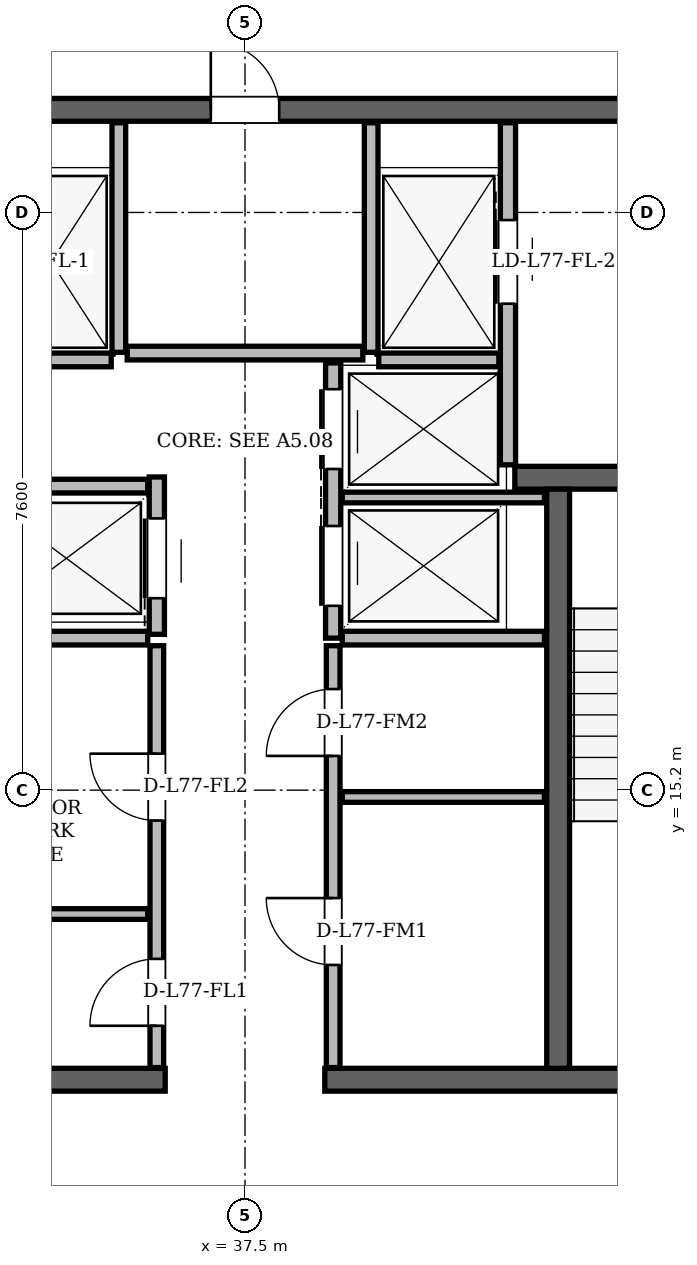
"""IFC4 building model, lengths in metres.
Left out: names, types, materials, properties, quantities, classifications, styles, units other than length and angle.
Written with IfcOpenShell. Run it as: python <this file> out.ifc"""

import sys

from ifc_helpers import new_model, si_unit, direction, frame, frame_2d, origin, place, context, subcontext, project, spatial, rectangle, extrude, element, fill, save


model = new_model("IFC4")
c1 = context("Model", 3, precision=1e-05, world=origin(), true_north=direction((0.0, 1.0)))
c2 = subcontext(c1, "Body", "Model", "MODEL_VIEW")
j1 = project(units=[si_unit("LENGTHUNIT", "METRE"), si_unit("PLANEANGLEUNIT", "RADIAN")], contexts=[c1])
p1 = place(None, origin())
s1 = spatial("IfcSite", under=j1, at=p1, CompositionType="ELEMENT")
p2 = place(p1, origin())
s2 = spatial("IfcBuilding", under=s1, at=p2, CompositionType="ELEMENT")
p3 = place(p2, frame((0.0, 0.0, 292.8)))
s3 = spatial("IfcBuildingStorey", under=s2, at=p3, CompositionType="ELEMENT", Elevation=292.8)
for number, where, z_axis, x_axis in (
    (1, (29.35, 11.39, 0.0), (0.0, 0.0, 1.0), (1.0, 0.0, 0.0)),
    (2, (38.55, 11.39, 0.0), (0.0, 0.0, 1.0), (1.0, 0.0, 0.0)),
):
    element("IfcWall", number, at=place(p3, frame(where, z_axis=z_axis, x_axis=x_axis)), inside=s3, PredefinedType="SHEAR", context=c2, shape_type="SweptSolid", body=[
        extrude(rectangle(XDim=7.1, YDim=0.3, at=frame_2d((3.55, 0.0))), origin(), (0.0, 0.0, 1.0), 3.68),
    ])
p4 = place(p3, frame((29.65, 24.15, 0.0), z_axis=(0.0, 0.0, 1.0), x_axis=(1.0, 0.0, 0.0)))
e3 = element("IfcWall", 3, at=p4, inside=s3, PredefinedType="SHEAR", context=c2, shape_type="SweptSolid", body=[
    extrude(rectangle(XDim=15.7, YDim=0.3, at=frame_2d((7.85, 0.0))), origin(), (0.0, 0.0, 1.0), 3.68),
])
p5 = place(p4, frame((1.7, 0.0, 0.0)))
e4 = element("IfcOpeningElement", 4, at=p5, cuts=e3, PredefinedType="OPENING", context=c2, shape_type="SweptSolid", body=[
    extrude(rectangle(XDim=1.2, YDim=2.2, at=frame_2d((0.6, 1.1))), frame((0.0, 0.15, 0.0), z_axis=(0.0, -1.0, 0.0), x_axis=(1.0, 0.0, 0.0)), (0.0, 0.0, 1.0), 0.3),
])
p6 = place(p4, frame((12.8, 0.0, 0.0)))
e5 = element("IfcOpeningElement", 5, at=p6, cuts=e3, PredefinedType="OPENING", context=c2, shape_type="SweptSolid", body=[
    extrude(rectangle(XDim=1.2, YDim=2.2, at=frame_2d((0.6, 1.1))), frame((0.0, 0.15, 0.0), z_axis=(0.0, -1.0, 0.0), x_axis=(1.0, 0.0, 0.0)), (0.0, 0.0, 1.0), 0.3),
])
p7 = place(p4, frame((7.4, 0.0, 0.0)))
e6 = element("IfcOpeningElement", 6, at=p7, cuts=e3, PredefinedType="OPENING", context=c2, shape_type="SweptSolid", body=[
    extrude(rectangle(XDim=0.9, YDim=2.05, at=frame_2d((0.45, 1.025))), frame((0.0, 0.15, 0.0), z_axis=(0.0, -1.0, 0.0), x_axis=(1.0, 0.0, 0.0)), (0.0, 0.0, 1.0), 0.3),
])
p8 = place(p3, frame((41.05, 19.31, 0.0), z_axis=(0.0, 0.0, 1.0), x_axis=(1.0, 0.0, 0.0)))
e7 = element("IfcWall", 7, at=p8, inside=s3, PredefinedType="SHEAR", context=c2, shape_type="SweptSolid", body=[
    extrude(rectangle(XDim=4.01, YDim=0.3, at=frame_2d((2.005, 0.0))), origin(), (0.0, 0.0, 1.0), 3.68),
])
p9 = place(p8, frame((1.6, 0.0, 0.0)))
e8 = element("IfcOpeningElement", 8, at=p9, cuts=e7, PredefinedType="OPENING", context=c2, shape_type="SweptSolid", body=[
    extrude(rectangle(XDim=1.4, YDim=2.2, at=frame_2d((0.7, 1.1))), frame((0.0, 0.15, 0.0), z_axis=(0.0, -1.0, 0.0), x_axis=(1.0, 0.0, 0.0)), (0.0, 0.0, 1.0), 0.3),
])
p10 = place(p3, frame((41.62, 11.54, 0.0), z_axis=(0.0, 0.0, 1.0), x_axis=(0.0, 1.0, 0.0)))
e9 = element("IfcWall", 9, at=p10, inside=s3, PredefinedType="SHEAR", context=c2, shape_type="SweptSolid", body=[
    extrude(rectangle(XDim=7.62, YDim=0.3, at=frame_2d((3.81, 0.0))), origin(), (0.0, 0.0, 1.0), 3.68),
])
p11 = place(p3, frame((58.337, 10.439, 0.0), z_axis=(0.0, 0.0, 1.0), x_axis=(-0.499999767403, 0.866025538074, 0.0)))
e10 = element("IfcWall", 10, at=p11, inside=s3, PredefinedType="SOLIDWALL", context=c2, shape_type="SweptSolid", body=[
    extrude(rectangle(XDim=37.57, YDim=0.29, at=frame_2d((18.785, 0.0))), origin(), (0.0, 0.0, 1.0), 3.058),
])
p12 = place(p11, frame((8.034, 0.0, 0.0)))
e11 = element("IfcOpeningElement", 11, at=p12, cuts=e10, PredefinedType="OPENING", context=c2, shape_type="SweptSolid", body=[
    extrude(rectangle(XDim=1.5, YDim=2.2, at=frame_2d((0.75, 1.1))), frame((0.0, 0.145, 0.0), z_axis=(0.0, -1.0, 0.0), x_axis=(1.0, 0.0, 0.0)), (0.0, 0.0, 1.0), 0.29),
])
p13 = place(p11, frame((32.531, 0.0, 0.0)))
e12 = element("IfcOpeningElement", 12, at=p13, cuts=e10, PredefinedType="OPENING", context=c2, shape_type="SweptSolid", body=[
    extrude(rectangle(XDim=1.3, YDim=2.2, at=frame_2d((0.65, 1.1))), frame((0.0, 0.145, 0.0), z_axis=(0.0, -1.0, 0.0), x_axis=(1.0, 0.0, 0.0)), (0.0, 0.0, 1.0), 0.29),
])
p14 = place(p11, frame((0.916, 0.0, 0.85)))
e13 = element("IfcOpeningElement", 13, at=p14, cuts=e10, PredefinedType="OPENING", context=c2, shape_type="SweptSolid", body=[
    extrude(rectangle(XDim=1.2, YDim=1.48, at=frame_2d((0.6, 0.74))), frame((0.0, 0.145, 0.0), z_axis=(0.0, -1.0, 0.0), x_axis=(1.0, 0.0, 0.0)), (0.0, 0.0, 1.0), 0.29),
])
p15 = place(p11, frame((13.243, 0.0, 0.85)))
e14 = element("IfcOpeningElement", 14, at=p15, cuts=e10, PredefinedType="OPENING", context=c2, shape_type="SweptSolid", body=[
    extrude(rectangle(XDim=1.6, YDim=1.7, at=frame_2d((0.8, 0.85))), frame((0.0, 0.145, 0.0), z_axis=(0.0, -1.0, 0.0), x_axis=(1.0, 0.0, 0.0)), (0.0, 0.0, 1.0), 0.29),
])
p16 = place(p11, frame((2.444, 0.0, 0.85)))
e15 = element("IfcOpeningElement", 15, at=p16, cuts=e10, PredefinedType="OPENING", context=c2, shape_type="SweptSolid", body=[
    extrude(rectangle(XDim=1.2, YDim=1.48, at=frame_2d((0.6, 0.74))), frame((0.0, 0.145, 0.0), z_axis=(0.0, -1.0, 0.0), x_axis=(1.0, 0.0, 0.0)), (0.0, 0.0, 1.0), 0.29),
])
p17 = place(p11, frame((35.19, 0.0, 0.85)))
e16 = element("IfcOpeningElement", 16, at=p17, cuts=e10, PredefinedType="OPENING", context=c2, shape_type="SweptSolid", body=[
    extrude(rectangle(XDim=1.2, YDim=1.48, at=frame_2d((0.6, 0.74))), frame((0.0, 0.145, 0.0), z_axis=(0.0, -1.0, 0.0), x_axis=(1.0, 0.0, 0.0)), (0.0, 0.0, 1.0), 0.29),
])
p18 = place(p11, frame((17.528, 0.0, 0.85)))
e17 = element("IfcOpeningElement", 17, at=p18, cuts=e10, PredefinedType="OPENING", context=c2, shape_type="SweptSolid", body=[
    extrude(rectangle(XDim=2.5, YDim=2.098, at=frame_2d((1.25, 1.049))), frame((0.0, 0.145, 0.0), z_axis=(0.0, -1.0, 0.0), x_axis=(1.0, 0.0, 0.0)), (0.0, 0.0, 1.0), 0.29),
])
p19 = place(p11, frame((27.565, 0.0, 0.85)))
e18 = element("IfcOpeningElement", 18, at=p19, cuts=e10, PredefinedType="OPENING", context=c2, shape_type="SweptSolid", body=[
    extrude(rectangle(XDim=1.2, YDim=1.48, at=frame_2d((0.6, 0.74))), frame((0.0, 0.145, 0.0), z_axis=(0.0, -1.0, 0.0), x_axis=(1.0, 0.0, 0.0)), (0.0, 0.0, 1.0), 0.29),
])
p20 = place(p3, frame((35.448, 42.976, 0.0), z_axis=(0.0, 0.0, 1.0), x_axis=(-0.499999767403, -0.866025538074, 0.0)))
e19 = element("IfcWall", 19, at=p20, inside=s3, PredefinedType="SOLIDWALL", context=c2, shape_type="SweptSolid", body=[
    extrude(rectangle(XDim=37.57, YDim=0.29, at=frame_2d((18.785, 0.0))), origin(), (0.0, 0.0, 1.0), 3.058),
])
p21 = place(p20, frame((8.034, 0.0, 0.0)))
e20 = element("IfcOpeningElement", 20, at=p21, cuts=e19, PredefinedType="OPENING", context=c2, shape_type="SweptSolid", body=[
    extrude(rectangle(XDim=1.5, YDim=2.2, at=frame_2d((0.75, 1.1))), frame((0.0, 0.145, 0.0), z_axis=(0.0, -1.0, 0.0), x_axis=(1.0, 0.0, 0.0)), (0.0, 0.0, 1.0), 0.29),
])
p22 = place(p20, frame((32.431, 0.0, 0.0)))
e21 = element("IfcOpeningElement", 21, at=p22, cuts=e19, PredefinedType="OPENING", context=c2, shape_type="SweptSolid", body=[
    extrude(rectangle(XDim=1.5, YDim=2.2, at=frame_2d((0.75, 1.1))), frame((0.0, 0.145, 0.0), z_axis=(0.0, -1.0, 0.0), x_axis=(1.0, 0.0, 0.0)), (0.0, 0.0, 1.0), 0.29),
])
p23 = place(p20, frame((27.302, 0.0, 0.85)))
e22 = element("IfcOpeningElement", 22, at=p23, cuts=e19, PredefinedType="OPENING", context=c2, shape_type="SweptSolid", body=[
    extrude(rectangle(XDim=2.2, YDim=1.85, at=frame_2d((1.1, 0.925))), frame((0.0, 0.145, 0.0), z_axis=(0.0, -1.0, 0.0), x_axis=(1.0, 0.0, 0.0)), (0.0, 0.0, 1.0), 0.29),
])
p24 = place(p20, frame((34.367, 0.0, 0.85)))
e23 = element("IfcOpeningElement", 23, at=p24, cuts=e19, PredefinedType="OPENING", context=c2, shape_type="SweptSolid", body=[
    extrude(rectangle(XDim=1.6, YDim=1.7, at=frame_2d((0.8, 0.85))), frame((0.0, 0.145, 0.0), z_axis=(0.0, -1.0, 0.0), x_axis=(1.0, 0.0, 0.0)), (0.0, 0.0, 1.0), 0.29),
])
p25 = place(p20, frame((21.688, 0.0, 0.85)))
e24 = element("IfcOpeningElement", 24, at=p25, cuts=e19, PredefinedType="OPENING", context=c2, shape_type="SweptSolid", body=[
    extrude(rectangle(XDim=1.2, YDim=1.48, at=frame_2d((0.6, 0.74))), frame((0.0, 0.145, 0.0), z_axis=(0.0, -1.0, 0.0), x_axis=(1.0, 0.0, 0.0)), (0.0, 0.0, 1.0), 0.29),
])
p26 = place(p20, frame((23.938, 0.0, 0.85)))
e25 = element("IfcOpeningElement", 25, at=p26, cuts=e19, PredefinedType="OPENING", context=c2, shape_type="SweptSolid", body=[
    extrude(rectangle(XDim=1.4, YDim=1.6, at=frame_2d((0.7, 0.8))), frame((0.0, 0.145, 0.0), z_axis=(0.0, -1.0, 0.0), x_axis=(1.0, 0.0, 0.0)), (0.0, 0.0, 1.0), 0.29),
])
p27 = place(p20, frame((15.363, 0.0, 0.85)))
e26 = element("IfcOpeningElement", 26, at=p27, cuts=e19, PredefinedType="OPENING", context=c2, shape_type="SweptSolid", body=[
    extrude(rectangle(XDim=2.4, YDim=1.9, at=frame_2d((1.2, 0.95))), frame((0.0, 0.145, 0.0), z_axis=(0.0, -1.0, 0.0), x_axis=(1.0, 0.0, 0.0)), (0.0, 0.0, 1.0), 0.29),
])
p28 = place(p20, frame((1.165, 0.0, 0.85)))
e27 = element("IfcOpeningElement", 27, at=p28, cuts=e19, PredefinedType="OPENING", context=c2, shape_type="SweptSolid", body=[
    extrude(rectangle(XDim=1.2, YDim=1.48, at=frame_2d((0.6, 0.74))), frame((0.0, 0.145, 0.0), z_axis=(0.0, -1.0, 0.0), x_axis=(1.0, 0.0, 0.0)), (0.0, 0.0, 1.0), 0.29),
])
p29 = place(p3, frame((35.84, 20.96, 0.0), z_axis=(0.0, 0.0, 1.0), x_axis=(0.0, 1.0, 0.0)))
e28 = element("IfcWall", 28, at=p29, inside=s3, PredefinedType="PARTITIONING", context=c2, shape_type="SweptSolid", body=[
    extrude(rectangle(XDim=3.02, YDim=0.18, at=frame_2d((1.51, 0.0))), origin(), (0.0, 0.0, 1.0), 3.68),
])
p30 = place(p3, frame((34.16, 20.86, 0.0), z_axis=(0.0, 0.0, 1.0), x_axis=(1.0, 0.0, 0.0)))
e29 = element("IfcWall", 29, at=p30, inside=s3, PredefinedType="PARTITIONING", context=c2, shape_type="SweptSolid", body=[
    extrude(rectangle(XDim=1.58, YDim=0.18, at=frame_2d((0.79, 0.0))), origin(), (0.0, 0.0, 1.0), 3.68),
])
p31 = place(p3, frame((40.96, 19.48, 0.0), z_axis=(0.0, 0.0, 1.0), x_axis=(0.0, 1.0, 0.0)))
e30 = element("IfcWall", 30, at=p31, inside=s3, PredefinedType="PARTITIONING", context=c2, shape_type="SweptSolid", body=[
    extrude(rectangle(XDim=4.5, YDim=0.2, at=frame_2d((2.25, 0.0))), origin(), (0.0, 0.0, 1.0), 3.68),
])
p32 = place(p31, frame((2.12, 0.0, 0.0)))
e31 = element("IfcOpeningElement", 31, at=p32, cuts=e30, PredefinedType="OPENING", context=c2, shape_type="SweptSolid", body=[
    extrude(rectangle(XDim=1.1, YDim=2.2, at=frame_2d((0.55, 1.1))), frame((0.0, 0.1, 0.0), z_axis=(0.0, -1.0, 0.0), x_axis=(1.0, 0.0, 0.0)), (0.0, 0.0, 1.0), 0.2),
])
p33 = place(p3, frame((39.16, 20.96, 0.0), z_axis=(0.0, 0.0, 1.0), x_axis=(0.0, 1.0, 0.0)))
e32 = element("IfcWall", 32, at=p33, inside=s3, PredefinedType="PARTITIONING", context=c2, shape_type="SweptSolid", body=[
    extrude(rectangle(XDim=3.02, YDim=0.18, at=frame_2d((1.51, 0.0))), origin(), (0.0, 0.0, 1.0), 3.68),
])
p34 = place(p3, frame((39.26, 20.86, 0.0), z_axis=(0.0, 0.0, 1.0), x_axis=(1.0, 0.0, 0.0)))
e33 = element("IfcWall", 33, at=p34, inside=s3, PredefinedType="PARTITIONING", context=c2, shape_type="SweptSolid", body=[
    extrude(rectangle(XDim=1.58, YDim=0.18, at=frame_2d((0.79, 0.0))), origin(), (0.0, 0.0, 1.0), 3.68),
])
p35 = place(p3, frame((36.34, 17.25, 0.0), z_axis=(0.0, 0.0, 1.0), x_axis=(0.0, 1.0, 0.0)))
e34 = element("IfcWall", 34, at=p35, inside=s3, PredefinedType="PARTITIONING", context=c2, shape_type="SweptSolid", body=[
    extrude(rectangle(XDim=2.07, YDim=0.2, at=frame_2d((1.035, 0.0))), origin(), (0.0, 0.0, 1.0), 3.68),
])
p36 = place(p35, frame((0.475, 0.0, 0.0)))
e35 = element("IfcOpeningElement", 35, at=p36, cuts=e34, PredefinedType="OPENING", context=c2, shape_type="SweptSolid", body=[
    extrude(rectangle(XDim=1.05, YDim=2.15, at=frame_2d((0.525, 1.075))), frame((0.0, 0.1, 0.0), z_axis=(0.0, -1.0, 0.0), x_axis=(1.0, 0.0, 0.0)), (0.0, 0.0, 1.0), 0.2),
])
p37 = place(p3, frame((33.95, 19.2, 0.0), z_axis=(0.0, 0.0, 1.0), x_axis=(1.0, 0.0, 0.0)))
e36 = element("IfcWall", 36, at=p37, inside=s3, PredefinedType="PARTITIONING", context=c2, shape_type="SweptSolid", body=[
    extrude(rectangle(XDim=2.27, YDim=0.18, at=frame_2d((1.135, 0.0))), origin(), (0.0, 0.0, 1.0), 3.68),
])
p38 = place(p3, frame((33.56, 17.2, 0.0), z_axis=(0.0, 0.0, 1.0), x_axis=(1.0, 0.0, 0.0)))
e37 = element("IfcWall", 37, at=p38, inside=s3, PredefinedType="PARTITIONING", context=c2, shape_type="SweptSolid", body=[
    extrude(rectangle(XDim=2.66, YDim=0.18, at=frame_2d((1.33, 0.0))), origin(), (0.0, 0.0, 1.0), 3.68),
])
p39 = place(p3, frame((36.34, 11.55, 0.0), z_axis=(0.0, 0.0, 1.0), x_axis=(0.0, 1.0, 0.0)))
e38 = element("IfcWall", 38, at=p39, inside=s3, PredefinedType="PARTITIONING", context=c2, shape_type="SweptSolid", body=[
    extrude(rectangle(XDim=5.55, YDim=0.18, at=frame_2d((2.775, 0.0))), origin(), (0.0, 0.0, 1.0), 3.68),
])
p40 = place(p39, frame((0.55, 0.0, 0.0)))
e39 = element("IfcOpeningElement", 39, at=p40, cuts=e38, PredefinedType="OPENING", context=c2, shape_type="SweptSolid", body=[
    extrude(rectangle(XDim=0.88, YDim=2.08, at=frame_2d((0.44, 1.04))), frame((0.0, 0.09, 0.0), z_axis=(0.0, -1.0, 0.0), x_axis=(1.0, 0.0, 0.0)), (0.0, 0.0, 1.0), 0.18),
])
p41 = place(p39, frame((3.25, 0.0, 0.0)))
e40 = element("IfcOpeningElement", 40, at=p41, cuts=e38, PredefinedType="OPENING", context=c2, shape_type="SweptSolid", body=[
    extrude(rectangle(XDim=0.88, YDim=2.08, at=frame_2d((0.44, 1.04))), frame((0.0, 0.09, 0.0), z_axis=(0.0, -1.0, 0.0), x_axis=(1.0, 0.0, 0.0)), (0.0, 0.0, 1.0), 0.18),
])
p42 = place(p3, frame((33.56, 13.57, 0.0), z_axis=(0.0, 0.0, 1.0), x_axis=(1.0, 0.0, 0.0)))
e41 = element("IfcWall", 41, at=p42, inside=s3, PredefinedType="PARTITIONING", context=c2, shape_type="SweptSolid", body=[
    extrude(rectangle(XDim=2.66, YDim=0.14, at=frame_2d((1.33, 0.0))), origin(), (0.0, 0.0, 1.0), 3.68),
])
p43 = place(p3, frame((38.66, 17.2, 0.0), z_axis=(0.0, 0.0, 1.0), x_axis=(0.0, 1.0, 0.0)))
e42 = element("IfcWall", 42, at=p43, inside=s3, PredefinedType="PARTITIONING", context=c2, shape_type="SweptSolid", body=[
    extrude(rectangle(XDim=3.62, YDim=0.2, at=frame_2d((1.81, 0.0))), origin(), (0.0, 0.0, 1.0), 3.68),
])
p44 = place(p43, frame((0.425, 0.0, 0.0)))
e43 = element("IfcOpeningElement", 43, at=p44, cuts=e42, PredefinedType="OPENING", context=c2, shape_type="SweptSolid", body=[
    extrude(rectangle(XDim=1.05, YDim=2.15, at=frame_2d((0.525, 1.075))), frame((0.0, 0.1, 0.0), z_axis=(0.0, -1.0, 0.0), x_axis=(1.0, 0.0, 0.0)), (0.0, 0.0, 1.0), 0.2),
])
p45 = place(p43, frame((2.225, 0.0, 0.0)))
e44 = element("IfcOpeningElement", 44, at=p45, cuts=e42, PredefinedType="OPENING", context=c2, shape_type="SweptSolid", body=[
    extrude(rectangle(XDim=1.05, YDim=2.15, at=frame_2d((0.525, 1.075))), frame((0.0, 0.1, 0.0), z_axis=(0.0, -1.0, 0.0), x_axis=(1.0, 0.0, 0.0)), (0.0, 0.0, 1.0), 0.2),
])
p46 = place(p3, frame((38.78, 17.2, 0.0), z_axis=(0.0, 0.0, 1.0), x_axis=(1.0, 0.0, 0.0)))
e45 = element("IfcWall", 45, at=p46, inside=s3, PredefinedType="PARTITIONING", context=c2, shape_type="SweptSolid", body=[
    extrude(rectangle(XDim=2.66, YDim=0.18, at=frame_2d((1.33, 0.0))), origin(), (0.0, 0.0, 1.0), 3.68),
])
p47 = place(p3, frame((38.78, 19.05, 0.0), z_axis=(0.0, 0.0, 1.0), x_axis=(1.0, 0.0, 0.0)))
e46 = element("IfcWall", 46, at=p47, inside=s3, PredefinedType="PARTITIONING", context=c2, shape_type="SweptSolid", body=[
    extrude(rectangle(XDim=2.66, YDim=0.14, at=frame_2d((1.33, 0.0))), origin(), (0.0, 0.0, 1.0), 3.68),
])
p48 = place(p3, frame((38.66, 11.55, 0.0), z_axis=(0.0, 0.0, 1.0), x_axis=(0.0, 1.0, 0.0)))
e47 = element("IfcWall", 47, at=p48, inside=s3, PredefinedType="PARTITIONING", context=c2, shape_type="SweptSolid", body=[
    extrude(rectangle(XDim=5.55, YDim=0.18, at=frame_2d((2.775, 0.0))), origin(), (0.0, 0.0, 1.0), 3.68),
])
p49 = place(p48, frame((1.35, 0.0, 0.0)))
e48 = element("IfcOpeningElement", 48, at=p49, cuts=e47, PredefinedType="OPENING", context=c2, shape_type="SweptSolid", body=[
    extrude(rectangle(XDim=0.88, YDim=2.08, at=frame_2d((0.44, 1.04))), frame((0.0, 0.09, 0.0), z_axis=(0.0, -1.0, 0.0), x_axis=(1.0, 0.0, 0.0)), (0.0, 0.0, 1.0), 0.18),
])
p50 = place(p48, frame((4.1, 0.0, 0.0)))
e49 = element("IfcOpeningElement", 49, at=p50, cuts=e47, PredefinedType="OPENING", context=c2, shape_type="SweptSolid", body=[
    extrude(rectangle(XDim=0.88, YDim=2.08, at=frame_2d((0.44, 1.04))), frame((0.0, 0.09, 0.0), z_axis=(0.0, -1.0, 0.0), x_axis=(1.0, 0.0, 0.0)), (0.0, 0.0, 1.0), 0.18),
])
p51 = place(p3, frame((38.78, 15.11, 0.0), z_axis=(0.0, 0.0, 1.0), x_axis=(1.0, 0.0, 0.0)))
e50 = element("IfcWall", 50, at=p51, inside=s3, PredefinedType="PARTITIONING", context=c2, shape_type="SweptSolid", body=[
    extrude(rectangle(XDim=2.66, YDim=0.14, at=frame_2d((1.33, 0.0))), origin(), (0.0, 0.0, 1.0), 3.68),
])
p52 = place(p3, frame((35.95, 20.95, 0.0), z_axis=(0.0, 0.0, 1.0), x_axis=(1.0, 0.0, 0.0)))
e51 = element("IfcWall", 51, at=p52, inside=s3, PredefinedType="PARTITIONING", context=c2, shape_type="SweptSolid", body=[
    extrude(rectangle(XDim=3.1, YDim=0.18, at=frame_2d((1.55, 0.0))), origin(), (0.0, 0.0, 1.0), 3.68),
])
p53 = place(p40, origin())
e52 = element("IfcDoor", 52, at=p53, inside=s3, OperationType="SINGLE_SWING_LEFT", PredefinedType="DOOR", context=c2, shape_type="SweptSolid", body=[
    extrude(rectangle(XDim=0.88, YDim=2.08, at=frame_2d((0.44, 1.04))), frame((0.0, 0.025, 0.0), z_axis=(0.0, -1.0, 0.0), x_axis=(1.0, 0.0, 0.0)), (0.0, 0.0, 1.0), 0.05),
])
fill(e39, e52)
p54 = place(p41, origin())
e53 = element("IfcDoor", 53, at=p54, inside=s3, OperationType="SINGLE_SWING_RIGHT", PredefinedType="DOOR", context=c2, shape_type="SweptSolid", body=[
    extrude(rectangle(XDim=0.88, YDim=2.08, at=frame_2d((0.44, 1.04))), frame((0.0, 0.025, 0.0), z_axis=(0.0, -1.0, 0.0), x_axis=(1.0, 0.0, 0.0)), (0.0, 0.0, 1.0), 0.05),
])
fill(e40, e53)
p55 = place(p49, origin())
e54 = element("IfcDoor", 54, at=p55, inside=s3, OperationType="SINGLE_SWING_RIGHT", PredefinedType="DOOR", context=c2, shape_type="SweptSolid", body=[
    extrude(rectangle(XDim=0.88, YDim=2.08, at=frame_2d((0.44, 1.04))), frame((0.0, 0.025, 0.0), z_axis=(0.0, -1.0, 0.0), x_axis=(1.0, 0.0, 0.0)), (0.0, 0.0, 1.0), 0.05),
])
fill(e48, e54)
p56 = place(p50, origin())
e55 = element("IfcDoor", 55, at=p56, inside=s3, OperationType="SINGLE_SWING_LEFT", PredefinedType="DOOR", context=c2, shape_type="SweptSolid", body=[
    extrude(rectangle(XDim=0.88, YDim=2.08, at=frame_2d((0.44, 1.04))), frame((0.0, 0.025, 0.0), z_axis=(0.0, -1.0, 0.0), x_axis=(1.0, 0.0, 0.0)), (0.0, 0.0, 1.0), 0.05),
])
fill(e49, e55)
p57 = place(p32, origin())
e56 = element("IfcDoor", 56, at=p57, inside=s3, OperationType="SLIDING_TO_RIGHT", PredefinedType="DOOR", context=c2, shape_type="SweptSolid", body=[
    extrude(rectangle(XDim=1.1, YDim=2.2, at=frame_2d((0.55, 1.1))), frame((0.0, 0.025, 0.0), z_axis=(0.0, -1.0, 0.0), x_axis=(1.0, 0.0, 0.0)), (0.0, 0.0, 1.0), 0.05),
])
fill(e31, e56)
p58 = place(p36, origin())
e57 = element("IfcDoor", 57, at=p58, inside=s3, OperationType="SLIDING_TO_LEFT", PredefinedType="DOOR", context=c2, shape_type="SweptSolid", body=[
    extrude(rectangle(XDim=1.05, YDim=2.15, at=frame_2d((0.525, 1.075))), frame((0.0, 0.025, 0.0), z_axis=(0.0, -1.0, 0.0), x_axis=(1.0, 0.0, 0.0)), (0.0, 0.0, 1.0), 0.05),
])
fill(e35, e57)
p59 = place(p44, origin())
e58 = element("IfcDoor", 58, at=p59, inside=s3, OperationType="SLIDING_TO_RIGHT", PredefinedType="DOOR", context=c2, shape_type="SweptSolid", body=[
    extrude(rectangle(XDim=1.05, YDim=2.15, at=frame_2d((0.525, 1.075))), frame((0.0, 0.025, 0.0), z_axis=(0.0, -1.0, 0.0), x_axis=(1.0, 0.0, 0.0)), (0.0, 0.0, 1.0), 0.05),
])
fill(e43, e58)
p60 = place(p45, origin())
e59 = element("IfcDoor", 59, at=p60, inside=s3, OperationType="SLIDING_TO_LEFT", PredefinedType="DOOR", context=c2, shape_type="SweptSolid", body=[
    extrude(rectangle(XDim=1.05, YDim=2.15, at=frame_2d((0.525, 1.075))), frame((0.0, 0.025, 0.0), z_axis=(0.0, -1.0, 0.0), x_axis=(1.0, 0.0, 0.0)), (0.0, 0.0, 1.0), 0.05),
])
fill(e44, e59)
p61 = place(p7, origin())
e60 = element("IfcDoor", 60, at=p61, inside=s3, OperationType="SINGLE_SWING_LEFT", PredefinedType="DOOR", context=c2, shape_type="SweptSolid", body=[
    extrude(rectangle(XDim=0.9, YDim=2.05, at=frame_2d((0.45, 1.025))), frame((0.0, 0.025, 0.0), z_axis=(0.0, -1.0, 0.0), x_axis=(1.0, 0.0, 0.0)), (0.0, 0.0, 1.0), 0.05),
])
fill(e6, e60)
save(model, sys.argv[1])
